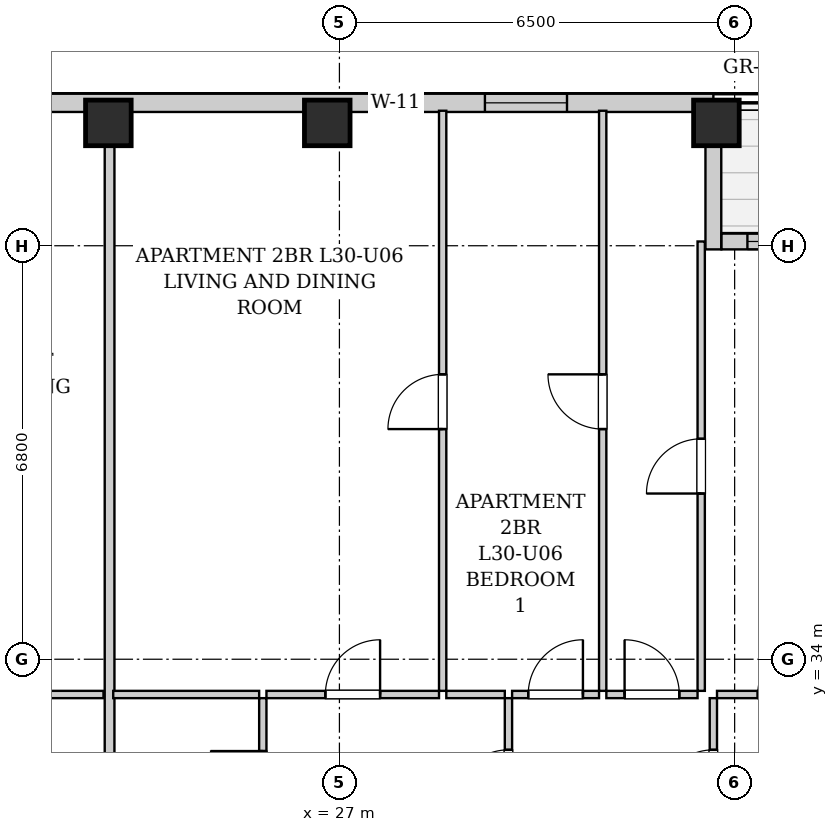
"""IFC4 building model, lengths in metres.
Left out: names, types, materials, properties, quantities, classifications, styles, units other than length and angle.
Written with IfcOpenShell. Run it as: python <this file> out.ifc"""

import sys

from ifc_helpers import new_model, si_unit, direction, frame, frame_2d, origin, origin_2d, place, context, subcontext, project, spatial, rectangle, extrude, element, fill, save


model = new_model("IFC4")
c1 = context("Model", 3, precision=1e-05, world=origin(), true_north=direction((0.0, 1.0)))
c2 = subcontext(c1, "Body", "Model", "MODEL_VIEW")
j1 = project(units=[si_unit("LENGTHUNIT", "METRE"), si_unit("PLANEANGLEUNIT", "RADIAN")], contexts=[c1])
p1 = place(None, origin())
s1 = spatial("IfcSite", under=j1, at=p1, CompositionType="ELEMENT")
p2 = place(p1, origin())
s2 = spatial("IfcBuilding", under=s1, at=p2, CompositionType="ELEMENT")
p3 = place(p2, frame((0.0, 0.0, 107.1)))
s3 = spatial("IfcBuildingStorey", under=s2, at=p3, CompositionType="ELEMENT", Elevation=107.1)
for number, where, z_axis, x_axis in (
    (1, (23.2, 42.82, 0.0), (0.0, 0.0, 1.0), (1.0, 0.0, 0.0)),
    (2, (26.8, 42.82, 0.0), (0.0, 0.0, 1.0), (1.0, 0.0, 0.0)),
    (3, (33.2, 42.82, 0.0), (0.0, 0.0, 1.0), (1.0, 0.0, 0.0)),
):
    element("IfcColumn", number, at=place(p3, frame(where, z_axis=z_axis, x_axis=x_axis)), inside=s3, PredefinedType="COLUMN", context=c2, shape_type="SweptSolid", body=[
        extrude(rectangle(XDim=0.75, YDim=0.75, at=origin_2d()), origin(), (0.0, 0.0, 1.0), 3.2),
    ])
p4 = place(p3, frame((10.0, 43.15, 0.0), z_axis=(0.0, 0.0, 1.0), x_axis=(1.0, 0.0, 0.0)))
e4 = element("IfcWall", 4, at=p4, inside=s3, PredefinedType="SOLIDWALL", context=c2, shape_type="SweptSolid", body=[
    extrude(rectangle(XDim=23.15, YDim=0.3, at=frame_2d((11.575, 0.0))), origin(), (0.0, 0.0, 1.0), 2.94),
])
p5 = place(p4, frame((4.735, 0.0, 0.55)))
e5 = element("IfcOpeningElement", 5, at=p5, cuts=e4, PredefinedType="OPENING", context=c2, shape_type="SweptSolid", body=[
    extrude(rectangle(XDim=1.35, YDim=1.2, at=frame_2d((0.675, 0.6))), frame((0.0, 0.16, 0.0), z_axis=(0.0, -1.0, 0.0), x_axis=(1.0, 0.0, 0.0)), (0.0, 0.0, 1.0), 0.32),
])
p6 = place(p4, frame((1.27, 0.0, 0.55)))
e6 = element("IfcOpeningElement", 6, at=p6, cuts=e4, PredefinedType="OPENING", context=c2, shape_type="SweptSolid", body=[
    extrude(rectangle(XDim=1.35, YDim=1.2, at=frame_2d((0.675, 0.6))), frame((0.0, 0.16, 0.0), z_axis=(0.0, -1.0, 0.0), x_axis=(1.0, 0.0, 0.0)), (0.0, 0.0, 1.0), 0.32),
])
p7 = place(p4, frame((9.773, 0.0, 0.55)))
e7 = element("IfcOpeningElement", 7, at=p7, cuts=e4, PredefinedType="OPENING", context=c2, shape_type="SweptSolid", body=[
    extrude(rectangle(XDim=1.35, YDim=1.2, at=frame_2d((0.675, 0.6))), frame((0.0, 0.16, 0.0), z_axis=(0.0, -1.0, 0.0), x_axis=(1.0, 0.0, 0.0)), (0.0, 0.0, 1.0), 0.32),
])
p8 = place(p4, frame((17.5, 0.0, 0.55)))
e8 = element("IfcOpeningElement", 8, at=p8, cuts=e4, PredefinedType="OPENING", context=c2, shape_type="SweptSolid", body=[
    extrude(rectangle(XDim=0.85, YDim=1.2, at=frame_2d((0.425, 0.6))), frame((0.0, 0.16, 0.0), z_axis=(0.0, -1.0, 0.0), x_axis=(1.0, 0.0, 0.0)), (0.0, 0.0, 1.0), 0.32),
])
p9 = place(p4, frame((19.393, 0.0, 0.55)))
e9 = element("IfcOpeningElement", 9, at=p9, cuts=e4, PredefinedType="OPENING", context=c2, shape_type="SweptSolid", body=[
    extrude(rectangle(XDim=1.35, YDim=1.2, at=frame_2d((0.675, 0.6))), frame((0.0, 0.16, 0.0), z_axis=(0.0, -1.0, 0.0), x_axis=(1.0, 0.0, 0.0)), (0.0, 0.0, 1.0), 0.32),
])
p10 = place(p3, frame((33.15, 43.14, 0.0), z_axis=(0.0, 0.0, 1.0), x_axis=(0.0, -1.0, 0.0)))
e10 = element("IfcWall", 10, at=p10, inside=s3, PredefinedType="SOLIDWALL", context=c2, shape_type="SweptSolid", body=[
    extrude(rectangle(XDim=2.4, YDim=0.26, at=frame_2d((1.2, 0.0))), origin(), (0.0, 0.0, 1.0), 2.313),
])
p11 = place(p3, frame((33.284, 40.87, 0.0), z_axis=(0.0, 0.0, 1.0), x_axis=(1.0, 0.0, 0.0)))
e11 = element("IfcWall", 11, at=p11, inside=s3, PredefinedType="SOLIDWALL", context=c2, shape_type="SweptSolid", body=[
    extrude(rectangle(XDim=4.882, YDim=0.26, at=frame_2d((2.441, 0.0))), origin(), (0.0, 0.0, 1.0), 2.94),
])
p12 = place(p11, frame((2.426, 0.0, 0.0)))
e12 = element("IfcOpeningElement", 12, at=p12, cuts=e11, PredefinedType="OPENING", context=c2, shape_type="SweptSolid", body=[
    extrude(rectangle(XDim=1.1, YDim=2.0, at=frame_2d((0.55, 1.0))), frame((0.0, 0.14, 0.0), z_axis=(0.0, -1.0, 0.0), x_axis=(1.0, 0.0, 0.0)), (0.0, 0.0, 1.0), 0.28),
])
p13 = place(p11, frame((0.426, 0.0, 0.85)))
e13 = element("IfcOpeningElement", 13, at=p13, cuts=e11, PredefinedType="OPENING", context=c2, shape_type="SweptSolid", body=[
    extrude(rectangle(XDim=1.6, YDim=1.65, at=frame_2d((0.8, 0.825))), frame((0.0, 0.14, 0.0), z_axis=(0.0, -1.0, 0.0), x_axis=(1.0, 0.0, 0.0)), (0.0, 0.0, 1.0), 0.28),
])
p14 = place(p11, frame((3.686, 0.0, 0.55)))
e14 = element("IfcOpeningElement", 14, at=p14, cuts=e11, PredefinedType="OPENING", context=c2, shape_type="SweptSolid", body=[
    extrude(rectangle(XDim=0.85, YDim=1.2, at=frame_2d((0.425, 0.6))), frame((0.0, 0.14, 0.0), z_axis=(0.0, -1.0, 0.0), x_axis=(1.0, 0.0, 0.0)), (0.0, 0.0, 1.0), 0.28),
])
p15 = place(p3, frame((19.85, 33.42, 0.0), z_axis=(0.0, 0.0, 1.0), x_axis=(1.0, 0.0, 0.0)))
e15 = element("IfcWall", 15, at=p15, inside=s3, PredefinedType="PARTITIONING", context=c2, shape_type="SweptSolid", body=[
    extrude(rectangle(XDim=3.27, YDim=0.12, at=frame_2d((1.635, 0.0))), origin(), (0.0, 0.0, 1.0), 2.94),
])
p16 = place(p15, frame((1.185, 0.0, 0.0)))
e16 = element("IfcOpeningElement", 16, at=p16, cuts=e15, PredefinedType="OPENING", context=c2, shape_type="SweptSolid", body=[
    extrude(rectangle(XDim=0.9, YDim=2.05, at=frame_2d((0.45, 1.025))), frame((0.0, 0.07, 0.0), z_axis=(0.0, -1.0, 0.0), x_axis=(1.0, 0.0, 0.0)), (0.0, 0.0, 1.0), 0.14),
])
p17 = place(p3, frame((23.22, 30.76, 0.0), z_axis=(0.0, 0.0, 1.0), x_axis=(0.0, 1.0, 0.0)))
e17 = element("IfcWall", 17, at=p17, inside=s3, PredefinedType="PARTITIONING", context=c2, shape_type="SweptSolid", body=[
    extrude(rectangle(XDim=12.26, YDim=0.16, at=frame_2d((6.13, 0.0))), origin(), (0.0, 0.0, 1.0), 2.94),
])
p18 = place(p3, frame((25.74, 30.76, 0.0), z_axis=(0.0, 0.0, 1.0), x_axis=(0.0, 1.0, 0.0)))
e18 = element("IfcWall", 18, at=p18, inside=s3, PredefinedType="PARTITIONING", context=c2, shape_type="SweptSolid", body=[
    extrude(rectangle(XDim=2.6, YDim=0.12, at=frame_2d((1.3, 0.0))), origin(), (0.0, 0.0, 1.0), 2.94),
])
p19 = place(p18, frame((0.87, 0.0, 0.0)))
e19 = element("IfcOpeningElement", 19, at=p19, cuts=e18, PredefinedType="OPENING", context=c2, shape_type="SweptSolid", body=[
    extrude(rectangle(XDim=0.86, YDim=2.05, at=frame_2d((0.43, 1.025))), frame((0.0, 0.07, 0.0), z_axis=(0.0, -1.0, 0.0), x_axis=(1.0, 0.0, 0.0)), (0.0, 0.0, 1.0), 0.14),
])
p20 = place(p3, frame((23.28, 33.42, 0.0), z_axis=(0.0, 0.0, 1.0), x_axis=(1.0, 0.0, 0.0)))
e20 = element("IfcWall", 20, at=p20, inside=s3, PredefinedType="PARTITIONING", context=c2, shape_type="SweptSolid", body=[
    extrude(rectangle(XDim=2.4, YDim=0.12, at=frame_2d((1.2, 0.0))), origin(), (0.0, 0.0, 1.0), 2.94),
])
p21 = place(p3, frame((29.78, 30.76, 0.0), z_axis=(0.0, 0.0, 1.0), x_axis=(0.0, 1.0, 0.0)))
e21 = element("IfcWall", 21, at=p21, inside=s3, PredefinedType="PARTITIONING", context=c2, shape_type="SweptSolid", body=[
    extrude(rectangle(XDim=2.6, YDim=0.12, at=frame_2d((1.3, 0.0))), origin(), (0.0, 0.0, 1.0), 2.94),
])
p22 = place(p21, frame((0.85, 0.0, 0.0)))
e22 = element("IfcOpeningElement", 22, at=p22, cuts=e21, PredefinedType="OPENING", context=c2, shape_type="SweptSolid", body=[
    extrude(rectangle(XDim=0.9, YDim=2.05, at=frame_2d((0.45, 1.025))), frame((0.0, 0.07, 0.0), z_axis=(0.0, -1.0, 0.0), x_axis=(1.0, 0.0, 0.0)), (0.0, 0.0, 1.0), 0.14),
])
p23 = place(p3, frame((25.8, 33.42, 0.0), z_axis=(0.0, 0.0, 1.0), x_axis=(1.0, 0.0, 0.0)))
e23 = element("IfcWall", 23, at=p23, inside=s3, PredefinedType="PARTITIONING", context=c2, shape_type="SweptSolid", body=[
    extrude(rectangle(XDim=2.838, YDim=0.12, at=frame_2d((1.419, 0.0))), origin(), (0.0, 0.0, 1.0), 2.94),
])
p24 = place(p23, frame((0.969, 0.0, 0.0)))
e24 = element("IfcOpeningElement", 24, at=p24, cuts=e23, PredefinedType="OPENING", context=c2, shape_type="SweptSolid", body=[
    extrude(rectangle(XDim=0.9, YDim=2.05, at=frame_2d((0.45, 1.025))), frame((0.0, 0.07, 0.0), z_axis=(0.0, -1.0, 0.0), x_axis=(1.0, 0.0, 0.0)), (0.0, 0.0, 1.0), 0.14),
])
p25 = place(p3, frame((28.758, 33.42, 0.0), z_axis=(0.0, 0.0, 1.0), x_axis=(1.0, 0.0, 0.0)))
e25 = element("IfcWall", 25, at=p25, inside=s3, PredefinedType="PARTITIONING", context=c2, shape_type="SweptSolid", body=[
    extrude(rectangle(XDim=0.962, YDim=0.12, at=frame_2d((0.481, 0.0))), origin(), (0.0, 0.0, 1.0), 2.94),
])
p26 = place(p3, frame((33.15, 30.76, 0.0), z_axis=(0.0, 0.0, 1.0), x_axis=(0.0, 1.0, 0.0)))
e26 = element("IfcWall", 26, at=p26, inside=s3, PredefinedType="PARTITIONING", context=c2, shape_type="SweptSolid", body=[
    extrude(rectangle(XDim=2.6, YDim=0.12, at=frame_2d((1.3, 0.0))), origin(), (0.0, 0.0, 1.0), 2.313),
])
p27 = place(p26, frame((0.85, 0.0, 0.0)))
e27 = element("IfcOpeningElement", 27, at=p27, cuts=e26, PredefinedType="OPENING", context=c2, shape_type="SweptSolid", body=[
    extrude(rectangle(XDim=0.9, YDim=2.05, at=frame_2d((0.45, 1.025))), frame((0.0, 0.07, 0.0), z_axis=(0.0, -1.0, 0.0), x_axis=(1.0, 0.0, 0.0)), (0.0, 0.0, 1.0), 0.14),
])
p28 = place(p3, frame((29.84, 33.42, 0.0), z_axis=(0.0, 0.0, 1.0), x_axis=(1.0, 0.0, 0.0)))
e28 = element("IfcWall", 28, at=p28, inside=s3, PredefinedType="PARTITIONING", context=c2, shape_type="SweptSolid", body=[
    extrude(rectangle(XDim=1.43, YDim=0.12, at=frame_2d((0.715, 0.0))), origin(), (0.0, 0.0, 1.0), 2.94),
])
p29 = place(p28, frame((0.265, 0.0, 0.0)))
e29 = element("IfcOpeningElement", 29, at=p29, cuts=e28, PredefinedType="OPENING", context=c2, shape_type="SweptSolid", body=[
    extrude(rectangle(XDim=0.9, YDim=2.05, at=frame_2d((0.45, 1.025))), frame((0.0, 0.07, 0.0), z_axis=(0.0, -1.0, 0.0), x_axis=(1.0, 0.0, 0.0)), (0.0, 0.0, 1.0), 0.14),
])
p30 = place(p3, frame((31.39, 33.42, 0.0), z_axis=(0.0, 0.0, 1.0), x_axis=(1.0, 0.0, 0.0)))
e30 = element("IfcWall", 30, at=p30, inside=s3, PredefinedType="PARTITIONING", context=c2, shape_type="SweptSolid", body=[
    extrude(rectangle(XDim=1.5, YDim=0.12, at=frame_2d((0.75, 0.0))), origin(), (0.0, 0.0, 1.0), 2.94),
])
p31 = place(p30, frame((0.3, 0.0, 0.0)))
e31 = element("IfcOpeningElement", 31, at=p31, cuts=e30, PredefinedType="OPENING", context=c2, shape_type="SweptSolid", body=[
    extrude(rectangle(XDim=0.9, YDim=2.05, at=frame_2d((0.45, 1.025))), frame((0.0, 0.07, 0.0), z_axis=(0.0, -1.0, 0.0), x_axis=(1.0, 0.0, 0.0)), (0.0, 0.0, 1.0), 0.14),
])
p32 = place(p3, frame((33.21, 33.42, 0.0), z_axis=(0.0, 0.0, 1.0), x_axis=(1.0, 0.0, 0.0)))
e32 = element("IfcWall", 32, at=p32, inside=s3, PredefinedType="PARTITIONING", context=c2, shape_type="SweptSolid", body=[
    extrude(rectangle(XDim=2.24, YDim=0.12, at=frame_2d((1.12, 0.0))), origin(), (0.0, 0.0, 1.0), 2.94),
])
p33 = place(p32, frame((0.67, 0.0, 0.0)))
e33 = element("IfcOpeningElement", 33, at=p33, cuts=e32, PredefinedType="OPENING", context=c2, shape_type="SweptSolid", body=[
    extrude(rectangle(XDim=0.9, YDim=2.05, at=frame_2d((0.45, 1.025))), frame((0.0, 0.07, 0.0), z_axis=(0.0, -1.0, 0.0), x_axis=(1.0, 0.0, 0.0)), (0.0, 0.0, 1.0), 0.14),
])
p34 = place(p3, frame((28.698, 33.48, 0.0), z_axis=(0.0, 0.0, 1.0), x_axis=(0.0, 1.0, 0.0)))
e34 = element("IfcWall", 34, at=p34, inside=s3, PredefinedType="PARTITIONING", context=c2, shape_type="SweptSolid", body=[
    extrude(rectangle(XDim=9.54, YDim=0.12, at=frame_2d((4.77, 0.0))), origin(), (0.0, 0.0, 1.0), 2.94),
])
p35 = place(p34, frame((4.305, 0.0, 0.0)))
e35 = element("IfcOpeningElement", 35, at=p35, cuts=e34, PredefinedType="OPENING", context=c2, shape_type="SweptSolid", body=[
    extrude(rectangle(XDim=0.9, YDim=2.05, at=frame_2d((0.45, 1.025))), frame((0.0, 0.07, 0.0), z_axis=(0.0, -1.0, 0.0), x_axis=(1.0, 0.0, 0.0)), (0.0, 0.0, 1.0), 0.14),
])
p36 = place(p3, frame((31.33, 33.48, 0.0), z_axis=(0.0, 0.0, 1.0), x_axis=(0.0, 1.0, 0.0)))
e36 = element("IfcWall", 36, at=p36, inside=s3, PredefinedType="PARTITIONING", context=c2, shape_type="SweptSolid", body=[
    extrude(rectangle(XDim=9.54, YDim=0.12, at=frame_2d((4.77, 0.0))), origin(), (0.0, 0.0, 1.0), 2.94),
])
p37 = place(p36, frame((4.305, 0.0, 0.0)))
e37 = element("IfcOpeningElement", 37, at=p37, cuts=e36, PredefinedType="OPENING", context=c2, shape_type="SweptSolid", body=[
    extrude(rectangle(XDim=0.9, YDim=2.05, at=frame_2d((0.45, 1.025))), frame((0.0, 0.07, 0.0), z_axis=(0.0, -1.0, 0.0), x_axis=(1.0, 0.0, 0.0)), (0.0, 0.0, 1.0), 0.14),
])
p38 = place(p3, frame((32.95, 33.48, 0.0), z_axis=(0.0, 0.0, 1.0), x_axis=(0.0, 1.0, 0.0)))
e38 = element("IfcWall", 38, at=p38, inside=s3, PredefinedType="PARTITIONING", context=c2, shape_type="SweptSolid", body=[
    extrude(rectangle(XDim=7.39, YDim=0.12, at=frame_2d((3.695, 0.0))), origin(), (0.0, 0.0, 1.0), 2.94),
])
p39 = place(p38, frame((3.245, 0.0, 0.0)))
e39 = element("IfcOpeningElement", 39, at=p39, cuts=e38, PredefinedType="OPENING", context=c2, shape_type="SweptSolid", body=[
    extrude(rectangle(XDim=0.9, YDim=2.05, at=frame_2d((0.45, 1.025))), frame((0.0, 0.07, 0.0), z_axis=(0.0, -1.0, 0.0), x_axis=(1.0, 0.0, 0.0)), (0.0, 0.0, 1.0), 0.14),
])
p40 = place(p19, origin())
e40 = element("IfcDoor", 40, at=p40, inside=s3, OperationType="SINGLE_SWING_RIGHT", PredefinedType="DOOR", context=c2, shape_type="SweptSolid", body=[
    extrude(rectangle(XDim=0.86, YDim=2.05, at=frame_2d((0.43, 1.025))), frame((0.0, 0.025, 0.0), z_axis=(0.0, -1.0, 0.0), x_axis=(1.0, 0.0, 0.0)), (0.0, 0.0, 1.0), 0.05),
])
fill(e19, e40)
p41 = place(p22, origin())
e41 = element("IfcDoor", 41, at=p41, inside=s3, OperationType="SINGLE_SWING_LEFT", PredefinedType="DOOR", context=c2, shape_type="SweptSolid", body=[
    extrude(rectangle(XDim=0.9, YDim=2.05, at=frame_2d((0.45, 1.025))), frame((0.0, 0.025, 0.0), z_axis=(0.0, -1.0, 0.0), x_axis=(1.0, 0.0, 0.0)), (0.0, 0.0, 1.0), 0.05),
])
fill(e22, e41)
p42 = place(p24, origin())
e42 = element("IfcDoor", 42, at=p42, inside=s3, OperationType="SINGLE_SWING_RIGHT", PredefinedType="DOOR", context=c2, shape_type="SweptSolid", body=[
    extrude(rectangle(XDim=0.9, YDim=2.05, at=frame_2d((0.45, 1.025))), frame((0.0, 0.025, 0.0), z_axis=(0.0, -1.0, 0.0), x_axis=(1.0, 0.0, 0.0)), (0.0, 0.0, 1.0), 0.05),
])
fill(e24, e42)
p43 = place(p27, origin())
e43 = element("IfcDoor", 43, at=p43, inside=s3, OperationType="SINGLE_SWING_LEFT", PredefinedType="DOOR", context=c2, shape_type="SweptSolid", body=[
    extrude(rectangle(XDim=0.9, YDim=2.05, at=frame_2d((0.45, 1.025))), frame((0.0, 0.025, 0.0), z_axis=(0.0, -1.0, 0.0), x_axis=(1.0, 0.0, 0.0)), (0.0, 0.0, 1.0), 0.05),
])
fill(e27, e43)
p44 = place(p29, origin())
e44 = element("IfcDoor", 44, at=p44, inside=s3, OperationType="SINGLE_SWING_RIGHT", PredefinedType="DOOR", context=c2, shape_type="SweptSolid", body=[
    extrude(rectangle(XDim=0.9, YDim=2.05, at=frame_2d((0.45, 1.025))), frame((0.0, 0.025, 0.0), z_axis=(0.0, -1.0, 0.0), x_axis=(1.0, 0.0, 0.0)), (0.0, 0.0, 1.0), 0.05),
])
fill(e29, e44)
p45 = place(p31, origin())
e45 = element("IfcDoor", 45, at=p45, inside=s3, OperationType="SINGLE_SWING_LEFT", PredefinedType="DOOR", context=c2, shape_type="SweptSolid", body=[
    extrude(rectangle(XDim=0.9, YDim=2.05, at=frame_2d((0.45, 1.025))), frame((0.0, 0.025, 0.0), z_axis=(0.0, -1.0, 0.0), x_axis=(1.0, 0.0, 0.0)), (0.0, 0.0, 1.0), 0.05),
])
fill(e31, e45)
p46 = place(p33, origin())
e46 = element("IfcDoor", 46, at=p46, inside=s3, OperationType="SINGLE_SWING_RIGHT", PredefinedType="DOOR", context=c2, shape_type="SweptSolid", body=[
    extrude(rectangle(XDim=0.9, YDim=2.05, at=frame_2d((0.45, 1.025))), frame((0.0, 0.025, 0.0), z_axis=(0.0, -1.0, 0.0), x_axis=(1.0, 0.0, 0.0)), (0.0, 0.0, 1.0), 0.05),
])
fill(e33, e46)
p47 = place(p35, origin())
e47 = element("IfcDoor", 47, at=p47, inside=s3, OperationType="SINGLE_SWING_LEFT", PredefinedType="DOOR", context=c2, shape_type="SweptSolid", body=[
    extrude(rectangle(XDim=0.9, YDim=2.05, at=frame_2d((0.45, 1.025))), frame((0.0, 0.025, 0.0), z_axis=(0.0, -1.0, 0.0), x_axis=(1.0, 0.0, 0.0)), (0.0, 0.0, 1.0), 0.05),
])
fill(e35, e47)
p48 = place(p37, origin())
e48 = element("IfcDoor", 48, at=p48, inside=s3, OperationType="SINGLE_SWING_RIGHT", PredefinedType="DOOR", context=c2, shape_type="SweptSolid", body=[
    extrude(rectangle(XDim=0.9, YDim=2.05, at=frame_2d((0.45, 1.025))), frame((0.0, 0.025, 0.0), z_axis=(0.0, -1.0, 0.0), x_axis=(1.0, 0.0, 0.0)), (0.0, 0.0, 1.0), 0.05),
])
fill(e37, e48)
p49 = place(p39, origin())
e49 = element("IfcDoor", 49, at=p49, inside=s3, OperationType="SINGLE_SWING_LEFT", PredefinedType="DOOR", context=c2, shape_type="SweptSolid", body=[
    extrude(rectangle(XDim=0.9, YDim=2.05, at=frame_2d((0.45, 1.025))), frame((0.0, 0.025, 0.0), z_axis=(0.0, -1.0, 0.0), x_axis=(1.0, 0.0, 0.0)), (0.0, 0.0, 1.0), 0.05),
])
fill(e39, e49)
p50 = place(p8, origin())
e50 = element("IfcWindow", 50, at=p50, inside=s3, PartitioningType="SINGLE_PANEL", PredefinedType="WINDOW", context=c2, shape_type="SweptSolid", body=[
    extrude(rectangle(XDim=0.85, YDim=1.2, at=frame_2d((0.425, 0.6))), frame((0.0, 0.03, 0.0), z_axis=(0.0, -1.0, 0.0), x_axis=(1.0, 0.0, 0.0)), (0.0, 0.0, 1.0), 0.06),
])
fill(e8, e50)
p51 = place(p9, origin())
e51 = element("IfcWindow", 51, at=p51, inside=s3, PartitioningType="SINGLE_PANEL", PredefinedType="WINDOW", context=c2, shape_type="SweptSolid", body=[
    extrude(rectangle(XDim=1.35, YDim=1.2, at=frame_2d((0.675, 0.6))), frame((0.0, 0.03, 0.0), z_axis=(0.0, -1.0, 0.0), x_axis=(1.0, 0.0, 0.0)), (0.0, 0.0, 1.0), 0.06),
])
fill(e9, e51)
p52 = place(p13, origin())
e52 = element("IfcWindow", 52, at=p52, inside=s3, PartitioningType="DOUBLE_PANEL_VERTICAL", PredefinedType="WINDOW", context=c2, shape_type="SweptSolid", body=[
    extrude(rectangle(XDim=1.6, YDim=1.65, at=frame_2d((0.8, 0.825))), frame((0.0, 0.03, 0.0), z_axis=(0.0, -1.0, 0.0), x_axis=(1.0, 0.0, 0.0)), (0.0, 0.0, 1.0), 0.06),
])
fill(e13, e52)
save(model, sys.argv[1])
